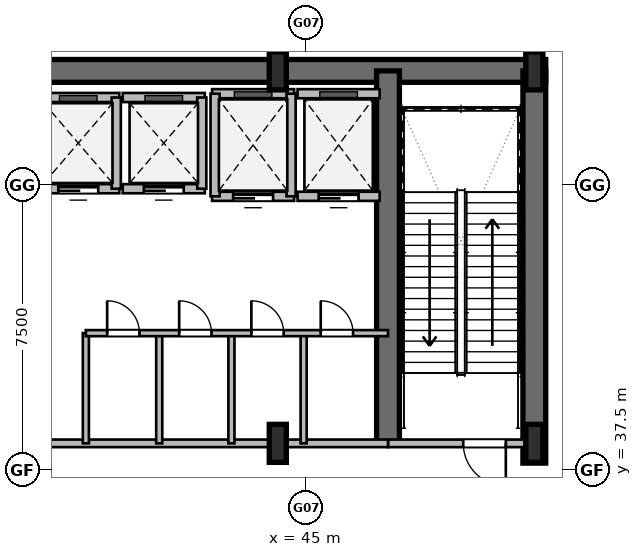
"""IFC4 building model, lengths in metres.
Left out: names, types, materials, properties, quantities, classifications, styles, units other than length and angle.
Written with IfcOpenShell. Run it as: python <this file> out.ifc"""

import sys

from ifc_helpers import new_model, si_unit, direction, frame, frame_2d, origin, origin_2d, place, context, subcontext, project, spatial, rectangle, i_section, extrude, element, fill, save


model = new_model("IFC4")
c1 = context("Model", 3, precision=1e-05, world=origin(), true_north=direction((0.0, 1.0)))
c2 = subcontext(c1, "Body", "Model", "MODEL_VIEW")
j1 = project(units=[si_unit("LENGTHUNIT", "METRE"), si_unit("PLANEANGLEUNIT", "RADIAN")], contexts=[c1])
p1 = place(None, origin())
s1 = spatial("IfcSite", under=j1, at=p1, CompositionType="ELEMENT")
p2 = place(p1, origin())
s2 = spatial("IfcBuilding", under=s1, at=p2, CompositionType="ELEMENT")
p3 = place(p2, origin())
s3 = spatial("IfcBuildingStorey", under=s2, at=p3, CompositionType="ELEMENT", Elevation=0.0)
p4 = place(p3, frame((23.7, 48.0, 0.0), z_axis=(0.0, 0.0, 1.0), x_axis=(1.0, 0.0, 0.0)))
e1 = element("IfcWall", 1, at=p4, inside=s3, PredefinedType="SHEAR", context=c2, shape_type="SweptSolid", body=[
    extrude(rectangle(XDim=27.6, YDim=0.6, at=frame_2d((13.8, 0.0))), origin(), (0.0, 0.0, 1.0), 6.0),
])
p5 = place(p3, frame((51.0, 37.68, 0.0), z_axis=(0.0, 0.0, 1.0), x_axis=(0.0, 1.0, 0.0)))
e2 = element("IfcWall", 2, at=p5, inside=s3, PredefinedType="SHEAR", context=c2, shape_type="SweptSolid", body=[
    extrude(rectangle(XDim=10.32, YDim=0.6, at=frame_2d((5.16, 0.0))), origin(), (0.0, 0.0, 1.0), 6.0),
])
p6 = place(p3, frame((47.15, 38.2, 0.0), z_axis=(0.0, 0.0, 1.0), x_axis=(0.0, 1.0, 0.0)))
e3 = element("IfcWall", 3, at=p6, inside=s3, PredefinedType="SHEAR", context=c2, shape_type="SweptSolid", body=[
    extrude(rectangle(XDim=9.8, YDim=0.6, at=frame_2d((4.9, 0.0))), origin(), (0.0, 0.0, 1.0), 6.0),
])
for number, where, z_axis, x_axis in (
    (4, (44.25, 38.2, 0.0), (0.0, 0.0, 1.0), (1.0, 0.0, 0.0)),
    (5, (44.25, 48.0, 0.0), (0.0, 0.0, 1.0), (1.0, 0.0, 0.0)),
    (6, (51.0, 38.2, 0.0), (0.0, 0.0, 1.0), (1.0, 0.0, 0.0)),
    (7, (51.0, 48.0, 0.0), (0.0, 0.0, 1.0), (1.0, 0.0, 0.0)),
):
    element("IfcColumn", number, at=place(p3, frame(where, z_axis=z_axis, x_axis=x_axis)), inside=s3, PredefinedType="COLUMN", context=c2, shape_type="SweptSolid", body=[
        extrude(i_section(OverallWidth=0.45, OverallDepth=1.0, WebThickness=0.022, FlangeThickness=0.04, at=origin_2d()), origin(), (0.0, 0.0, 1.0), 6.0),
    ])
p7 = place(p3, frame((51.0, 38.2, 0.0), z_axis=(0.0, 0.0, 1.0), x_axis=(-1.0, 0.0, 0.0)))
e8 = element("IfcWall", 8, at=p7, inside=s3, PredefinedType="PARTITIONING", context=c2, shape_type="SweptSolid", body=[
    extrude(rectangle(XDim=3.85, YDim=0.2, at=frame_2d((1.925, 0.0))), origin(), (0.0, 0.0, 1.0), 4.88),
])
p8 = place(p7, frame((0.75, 0.0, 0.0)))
e9 = element("IfcOpeningElement", 9, at=p8, cuts=e8, PredefinedType="OPENING", context=c2, shape_type="SweptSolid", body=[
    extrude(rectangle(XDim=1.12, YDim=2.1, at=frame_2d((0.56, 1.05))), frame((0.0, 0.11, 0.0), z_axis=(0.0, -1.0, 0.0), x_axis=(1.0, 0.0, 0.0)), (0.0, 0.0, 1.0), 0.22),
])
p9 = place(p3, frame((30.8, 38.2, 0.0), z_axis=(0.0, 0.0, 1.0), x_axis=(1.0, 0.0, 0.0)))
e10 = element("IfcWall", 10, at=p9, inside=s3, PredefinedType="PARTITIONING", context=c2, shape_type="SweptSolid", body=[
    extrude(rectangle(XDim=16.35, YDim=0.2, at=frame_2d((8.175, 0.0))), origin(), (0.0, 0.0, 1.0), 4.88),
])
p10 = place(p9, frame((2.95, 0.0, 0.0)))
e11 = element("IfcOpeningElement", 11, at=p10, cuts=e10, PredefinedType="OPENING", context=c2, shape_type="SweptSolid", body=[
    extrude(rectangle(XDim=1.12, YDim=2.1, at=frame_2d((0.56, 1.05))), frame((0.0, 0.11, 0.0), z_axis=(0.0, -1.0, 0.0), x_axis=(1.0, 0.0, 0.0)), (0.0, 0.0, 1.0), 0.22),
])
p11 = place(p3, frame((37.92, 44.9, 0.0), z_axis=(0.0, 0.0, 1.0), x_axis=(1.0, 0.0, 0.0)))
e12 = element("IfcWall", 12, at=p11, inside=s3, PredefinedType="PARTITIONING", context=c2, shape_type="SweptSolid", body=[
    extrude(rectangle(XDim=2.16, YDim=0.24, at=frame_2d((1.08, 0.0))), origin(), (0.0, 0.0, 1.0), 5.68),
])
p12 = place(p11, frame((0.555, 0.0, 0.0)))
e13 = element("IfcOpeningElement", 13, at=p12, cuts=e12, PredefinedType="OPENING", context=c2, shape_type="SweptSolid", body=[
    extrude(rectangle(XDim=1.05, YDim=2.15, at=frame_2d((0.525, 1.075))), frame((0.0, 0.13, 0.0), z_axis=(0.0, -1.0, 0.0), x_axis=(1.0, 0.0, 0.0)), (0.0, 0.0, 1.0), 0.26),
])
p13 = place(p3, frame((37.92, 47.3, 0.0), z_axis=(0.0, 0.0, 1.0), x_axis=(1.0, 0.0, 0.0)))
e14 = element("IfcWall", 14, at=p13, inside=s3, PredefinedType="PARTITIONING", context=c2, shape_type="SweptSolid", body=[
    extrude(rectangle(XDim=2.16, YDim=0.24, at=frame_2d((1.08, 0.0))), origin(), (0.0, 0.0, 1.0), 5.68),
])
p14 = place(p3, frame((40.0, 44.9, 0.0), z_axis=(0.0, 0.0, 1.0), x_axis=(0.0, 1.0, 0.0)))
e15 = element("IfcWall", 15, at=p14, inside=s3, PredefinedType="PARTITIONING", context=c2, shape_type="SweptSolid", body=[
    extrude(rectangle(XDim=2.4, YDim=0.24, at=frame_2d((1.2, 0.0))), origin(), (0.0, 0.0, 1.0), 5.68),
])
p15 = place(p3, frame((40.17, 44.9, 0.0), z_axis=(0.0, 0.0, 1.0), x_axis=(1.0, 0.0, 0.0)))
e16 = element("IfcWall", 16, at=p15, inside=s3, PredefinedType="PARTITIONING", context=c2, shape_type="SweptSolid", body=[
    extrude(rectangle(XDim=2.16, YDim=0.24, at=frame_2d((1.08, 0.0))), origin(), (0.0, 0.0, 1.0), 5.68),
])
p16 = place(p15, frame((0.555, 0.0, 0.0)))
e17 = element("IfcOpeningElement", 17, at=p16, cuts=e16, PredefinedType="OPENING", context=c2, shape_type="SweptSolid", body=[
    extrude(rectangle(XDim=1.05, YDim=2.15, at=frame_2d((0.525, 1.075))), frame((0.0, 0.13, 0.0), z_axis=(0.0, -1.0, 0.0), x_axis=(1.0, 0.0, 0.0)), (0.0, 0.0, 1.0), 0.26),
])
p17 = place(p3, frame((40.17, 47.3, 0.0), z_axis=(0.0, 0.0, 1.0), x_axis=(1.0, 0.0, 0.0)))
e18 = element("IfcWall", 18, at=p17, inside=s3, PredefinedType="PARTITIONING", context=c2, shape_type="SweptSolid", body=[
    extrude(rectangle(XDim=2.16, YDim=0.24, at=frame_2d((1.08, 0.0))), origin(), (0.0, 0.0, 1.0), 5.68),
])
p18 = place(p3, frame((42.25, 44.9, 0.0), z_axis=(0.0, 0.0, 1.0), x_axis=(0.0, 1.0, 0.0)))
e19 = element("IfcWall", 19, at=p18, inside=s3, PredefinedType="PARTITIONING", context=c2, shape_type="SweptSolid", body=[
    extrude(rectangle(XDim=2.4, YDim=0.24, at=frame_2d((1.2, 0.0))), origin(), (0.0, 0.0, 1.0), 5.68),
])
p19 = place(p3, frame((42.52, 44.7, 0.0), z_axis=(0.0, 0.0, 1.0), x_axis=(1.0, 0.0, 0.0)))
e20 = element("IfcWall", 20, at=p19, inside=s3, PredefinedType="PARTITIONING", context=c2, shape_type="SweptSolid", body=[
    extrude(rectangle(XDim=2.16, YDim=0.24, at=frame_2d((1.08, 0.0))), origin(), (0.0, 0.0, 1.0), 5.68),
])
p20 = place(p19, frame((0.555, 0.0, 0.0)))
e21 = element("IfcOpeningElement", 21, at=p20, cuts=e20, PredefinedType="OPENING", context=c2, shape_type="SweptSolid", body=[
    extrude(rectangle(XDim=1.05, YDim=2.15, at=frame_2d((0.525, 1.075))), frame((0.0, 0.13, 0.0), z_axis=(0.0, -1.0, 0.0), x_axis=(1.0, 0.0, 0.0)), (0.0, 0.0, 1.0), 0.26),
])
p21 = place(p3, frame((42.52, 47.4, 0.0), z_axis=(0.0, 0.0, 1.0), x_axis=(1.0, 0.0, 0.0)))
e22 = element("IfcWall", 22, at=p21, inside=s3, PredefinedType="PARTITIONING", context=c2, shape_type="SweptSolid", body=[
    extrude(rectangle(XDim=2.16, YDim=0.24, at=frame_2d((1.08, 0.0))), origin(), (0.0, 0.0, 1.0), 5.68),
])
for number, where, z_axis, x_axis in (
    (23, (42.6, 44.7, 0.0), (0.0, 0.0, 1.0), (0.0, 1.0, 0.0)),
    (24, (44.6, 44.7, 0.0), (0.0, 0.0, 1.0), (0.0, 1.0, 0.0)),
):
    element("IfcWall", number, at=place(p3, frame(where, z_axis=z_axis, x_axis=x_axis)), inside=s3, PredefinedType="PARTITIONING", context=c2, shape_type="SweptSolid", body=[
        extrude(rectangle(XDim=2.7, YDim=0.24, at=frame_2d((1.35, 0.0))), origin(), (0.0, 0.0, 1.0), 5.68),
    ])
p22 = place(p3, frame((44.77, 44.7, 0.0), z_axis=(0.0, 0.0, 1.0), x_axis=(1.0, 0.0, 0.0)))
e25 = element("IfcWall", 25, at=p22, inside=s3, PredefinedType="PARTITIONING", context=c2, shape_type="SweptSolid", body=[
    extrude(rectangle(XDim=2.16, YDim=0.24, at=frame_2d((1.08, 0.0))), origin(), (0.0, 0.0, 1.0), 5.68),
])
p23 = place(p22, frame((0.555, 0.0, 0.0)))
e26 = element("IfcOpeningElement", 26, at=p23, cuts=e25, PredefinedType="OPENING", context=c2, shape_type="SweptSolid", body=[
    extrude(rectangle(XDim=1.05, YDim=2.15, at=frame_2d((0.525, 1.075))), frame((0.0, 0.13, 0.0), z_axis=(0.0, -1.0, 0.0), x_axis=(1.0, 0.0, 0.0)), (0.0, 0.0, 1.0), 0.26),
])
p24 = place(p3, frame((44.77, 47.4, 0.0), z_axis=(0.0, 0.0, 1.0), x_axis=(1.0, 0.0, 0.0)))
e27 = element("IfcWall", 27, at=p24, inside=s3, PredefinedType="PARTITIONING", context=c2, shape_type="SweptSolid", body=[
    extrude(rectangle(XDim=2.16, YDim=0.24, at=frame_2d((1.08, 0.0))), origin(), (0.0, 0.0, 1.0), 5.68),
])
for number, where, z_axis, x_axis in (
    (28, (39.2, 38.2, 0.0), (0.0, 0.0, 1.0), (0.0, 1.0, 0.0)),
    (29, (41.13, 38.2, 0.0), (0.0, 0.0, 1.0), (0.0, 1.0, 0.0)),
    (30, (43.03, 38.2, 0.0), (0.0, 0.0, 1.0), (0.0, 1.0, 0.0)),
    (31, (44.93, 38.2, 0.0), (0.0, 0.0, 1.0), (0.0, 1.0, 0.0)),
):
    element("IfcWall", number, at=place(p3, frame(where, z_axis=z_axis, x_axis=x_axis)), inside=s3, PredefinedType="PARTITIONING", context=c2, shape_type="SweptSolid", body=[
        extrude(rectangle(XDim=2.9, YDim=0.16, at=frame_2d((1.45, 0.0))), origin(), (0.0, 0.0, 1.0), 5.68),
    ])
p25 = place(p3, frame((39.2, 41.1, 0.0), z_axis=(0.0, 0.0, 1.0), x_axis=(1.0, 0.0, 0.0)))
e32 = element("IfcWall", 32, at=p25, inside=s3, PredefinedType="PARTITIONING", context=c2, shape_type="SweptSolid", body=[
    extrude(rectangle(XDim=7.95, YDim=0.16, at=frame_2d((3.975, 0.0))), origin(), (0.0, 0.0, 1.0), 5.68),
])
p26 = place(p25, frame((0.56, 0.0, 0.0)))
e33 = element("IfcOpeningElement", 33, at=p26, cuts=e32, PredefinedType="OPENING", context=c2, shape_type="SweptSolid", body=[
    extrude(rectangle(XDim=0.85, YDim=2.05, at=frame_2d((0.425, 1.025))), frame((0.0, 0.09, 0.0), z_axis=(0.0, -1.0, 0.0), x_axis=(1.0, 0.0, 0.0)), (0.0, 0.0, 1.0), 0.18),
])
p27 = place(p25, frame((2.455, 0.0, 0.0)))
e34 = element("IfcOpeningElement", 34, at=p27, cuts=e32, PredefinedType="OPENING", context=c2, shape_type="SweptSolid", body=[
    extrude(rectangle(XDim=0.85, YDim=2.05, at=frame_2d((0.425, 1.025))), frame((0.0, 0.09, 0.0), z_axis=(0.0, -1.0, 0.0), x_axis=(1.0, 0.0, 0.0)), (0.0, 0.0, 1.0), 0.18),
])
p28 = place(p25, frame((4.355, 0.0, 0.0)))
e35 = element("IfcOpeningElement", 35, at=p28, cuts=e32, PredefinedType="OPENING", context=c2, shape_type="SweptSolid", body=[
    extrude(rectangle(XDim=0.85, YDim=2.05, at=frame_2d((0.425, 1.025))), frame((0.0, 0.09, 0.0), z_axis=(0.0, -1.0, 0.0), x_axis=(1.0, 0.0, 0.0)), (0.0, 0.0, 1.0), 0.18),
])
p29 = place(p25, frame((6.18, 0.0, 0.0)))
e36 = element("IfcOpeningElement", 36, at=p29, cuts=e32, PredefinedType="OPENING", context=c2, shape_type="SweptSolid", body=[
    extrude(rectangle(XDim=0.85, YDim=2.05, at=frame_2d((0.425, 1.025))), frame((0.0, 0.09, 0.0), z_axis=(0.0, -1.0, 0.0), x_axis=(1.0, 0.0, 0.0)), (0.0, 0.0, 1.0), 0.18),
])
p30 = place(p8, origin())
e37 = element("IfcDoor", 37, at=p30, inside=s3, OperationType="SINGLE_SWING_RIGHT", PredefinedType="DOOR", context=c2, shape_type="SweptSolid", body=[
    extrude(rectangle(XDim=1.12, YDim=2.1, at=frame_2d((0.56, 1.05))), frame((0.0, 0.025, 0.0), z_axis=(0.0, -1.0, 0.0), x_axis=(1.0, 0.0, 0.0)), (0.0, 0.0, 1.0), 0.05),
])
fill(e9, e37)
p31 = place(p12, origin())
e38 = element("IfcDoor", 38, at=p31, inside=s3, OperationType="SLIDING_TO_LEFT", PredefinedType="DOOR", context=c2, shape_type="SweptSolid", body=[
    extrude(rectangle(XDim=1.05, YDim=2.15, at=frame_2d((0.525, 1.075))), frame((0.0, 0.025, 0.0), z_axis=(0.0, -1.0, 0.0), x_axis=(1.0, 0.0, 0.0)), (0.0, 0.0, 1.0), 0.05),
])
fill(e13, e38)
p32 = place(p16, origin())
e39 = element("IfcDoor", 39, at=p32, inside=s3, OperationType="SLIDING_TO_LEFT", PredefinedType="DOOR", context=c2, shape_type="SweptSolid", body=[
    extrude(rectangle(XDim=1.05, YDim=2.15, at=frame_2d((0.525, 1.075))), frame((0.0, 0.025, 0.0), z_axis=(0.0, -1.0, 0.0), x_axis=(1.0, 0.0, 0.0)), (0.0, 0.0, 1.0), 0.05),
])
fill(e17, e39)
p33 = place(p20, origin())
e40 = element("IfcDoor", 40, at=p33, inside=s3, OperationType="SLIDING_TO_LEFT", PredefinedType="DOOR", context=c2, shape_type="SweptSolid", body=[
    extrude(rectangle(XDim=1.05, YDim=2.15, at=frame_2d((0.525, 1.075))), frame((0.0, 0.025, 0.0), z_axis=(0.0, -1.0, 0.0), x_axis=(1.0, 0.0, 0.0)), (0.0, 0.0, 1.0), 0.05),
])
fill(e21, e40)
p34 = place(p23, origin())
e41 = element("IfcDoor", 41, at=p34, inside=s3, OperationType="SLIDING_TO_LEFT", PredefinedType="DOOR", context=c2, shape_type="SweptSolid", body=[
    extrude(rectangle(XDim=1.05, YDim=2.15, at=frame_2d((0.525, 1.075))), frame((0.0, 0.025, 0.0), z_axis=(0.0, -1.0, 0.0), x_axis=(1.0, 0.0, 0.0)), (0.0, 0.0, 1.0), 0.05),
])
fill(e26, e41)
p35 = place(p26, origin())
e42 = element("IfcDoor", 42, at=p35, inside=s3, OperationType="SINGLE_SWING_RIGHT", PredefinedType="DOOR", context=c2, shape_type="SweptSolid", body=[
    extrude(rectangle(XDim=0.85, YDim=2.05, at=frame_2d((0.425, 1.025))), frame((0.0, 0.025, 0.0), z_axis=(0.0, -1.0, 0.0), x_axis=(1.0, 0.0, 0.0)), (0.0, 0.0, 1.0), 0.05),
])
fill(e33, e42)
p36 = place(p27, origin())
e43 = element("IfcDoor", 43, at=p36, inside=s3, OperationType="SINGLE_SWING_LEFT", PredefinedType="DOOR", context=c2, shape_type="SweptSolid", body=[
    extrude(rectangle(XDim=0.85, YDim=2.05, at=frame_2d((0.425, 1.025))), frame((0.0, 0.025, 0.0), z_axis=(0.0, -1.0, 0.0), x_axis=(1.0, 0.0, 0.0)), (0.0, 0.0, 1.0), 0.05),
])
fill(e34, e43)
p37 = place(p28, origin())
e44 = element("IfcDoor", 44, at=p37, inside=s3, OperationType="SINGLE_SWING_RIGHT", PredefinedType="DOOR", context=c2, shape_type="SweptSolid", body=[
    extrude(rectangle(XDim=0.85, YDim=2.05, at=frame_2d((0.425, 1.025))), frame((0.0, 0.025, 0.0), z_axis=(0.0, -1.0, 0.0), x_axis=(1.0, 0.0, 0.0)), (0.0, 0.0, 1.0), 0.05),
])
fill(e35, e44)
p38 = place(p29, origin())
e45 = element("IfcDoor", 45, at=p38, inside=s3, OperationType="SINGLE_SWING_LEFT", PredefinedType="DOOR", context=c2, shape_type="SweptSolid", body=[
    extrude(rectangle(XDim=0.85, YDim=2.05, at=frame_2d((0.425, 1.025))), frame((0.0, 0.025, 0.0), z_axis=(0.0, -1.0, 0.0), x_axis=(1.0, 0.0, 0.0)), (0.0, 0.0, 1.0), 0.05),
])
fill(e36, e45)
save(model, sys.argv[1])
